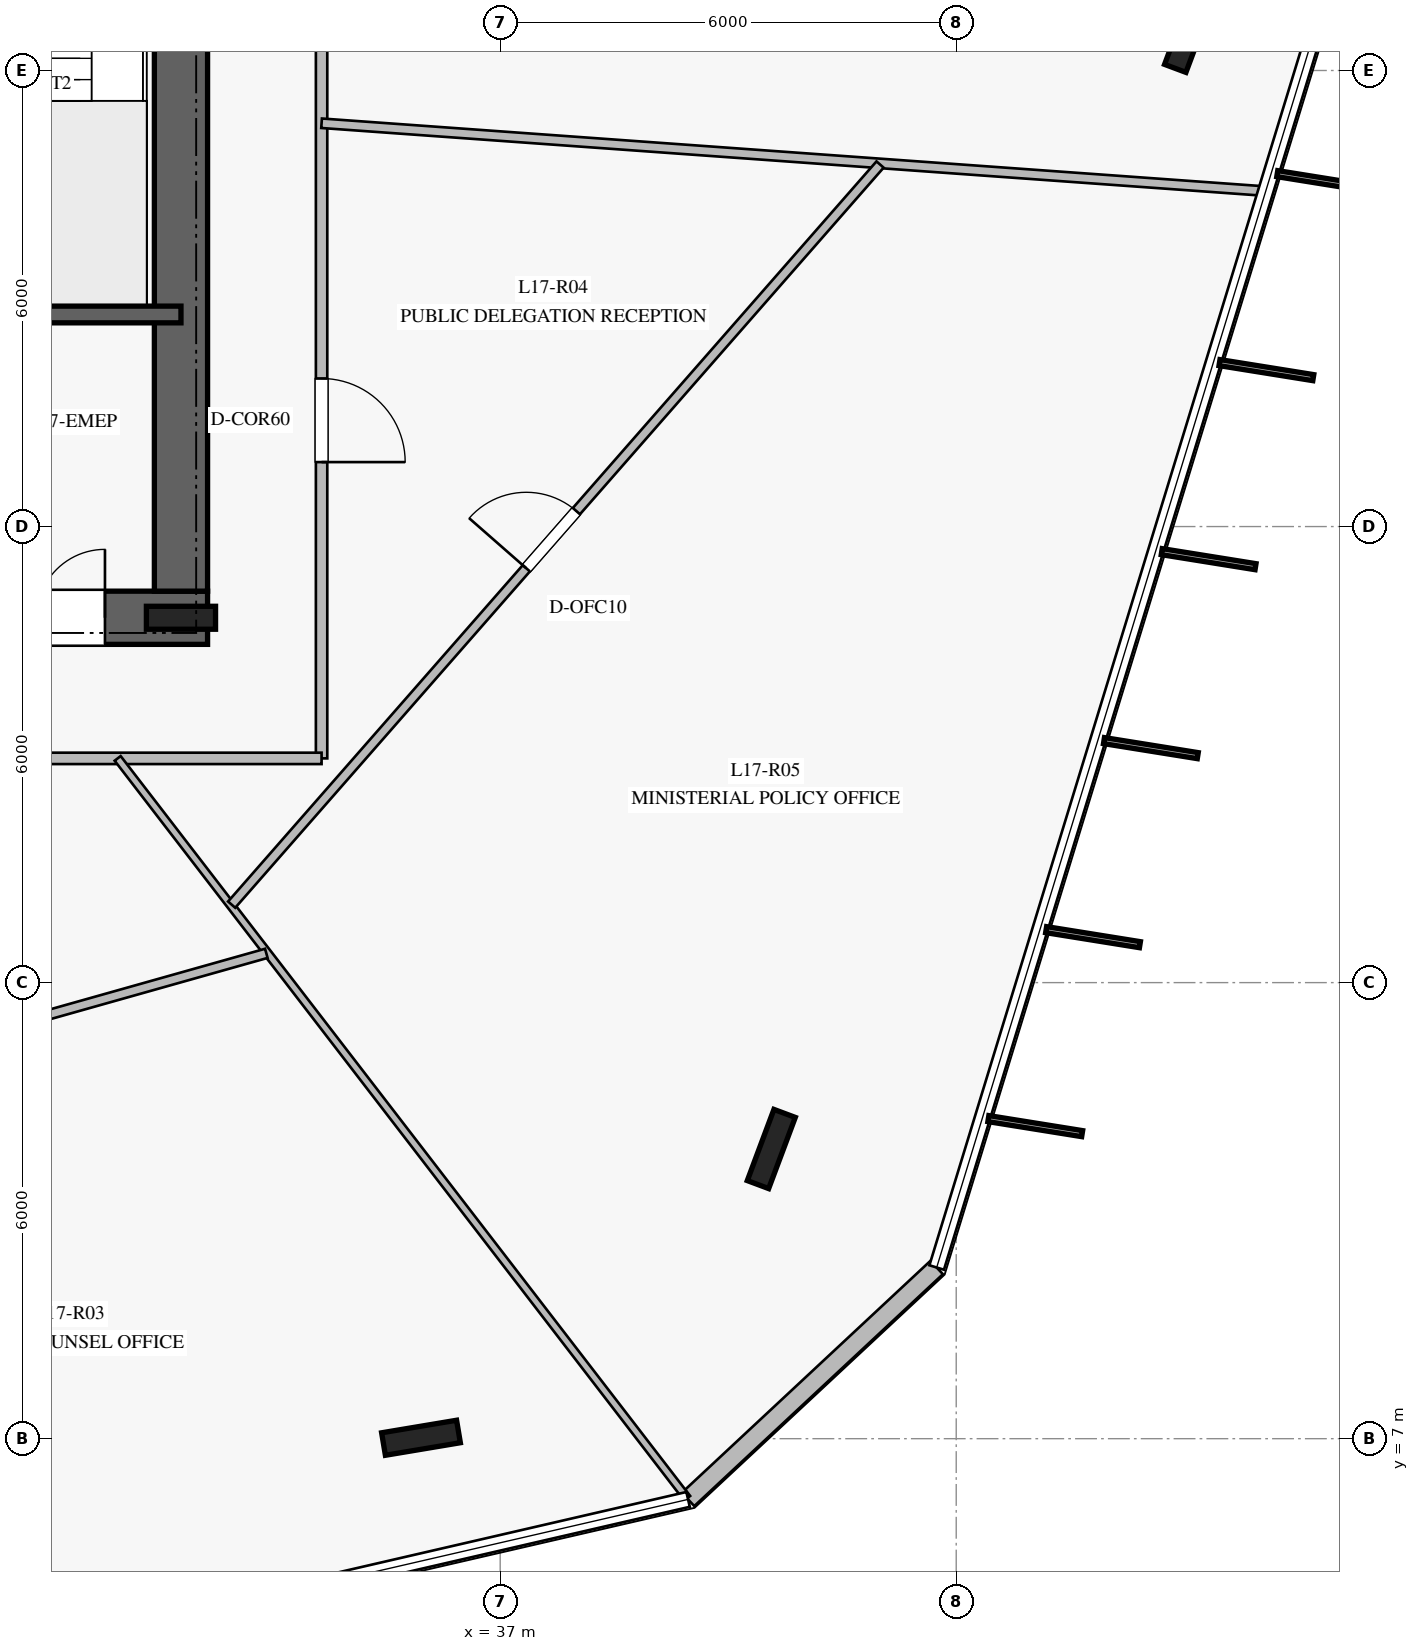
"""IFC4 building model, lengths in metres.
Left out: names, types, materials, properties, quantities, classifications, styles, units other than length and angle.
Written with IfcOpenShell. Run it as: python <this file> out.ifc"""

import sys

from ifc_helpers import new_model, si_unit, direction, frame, frame_2d, origin, origin_2d, place, context, subcontext, project, spatial, rectangle, i_section, extrude, element, fill, save


model = new_model("IFC4")
c1 = context("Model", 3, precision=1e-05, world=origin(), true_north=direction((0.0, 1.0)))
c2 = subcontext(c1, "Body", "Model", "MODEL_VIEW")
j1 = project(units=[si_unit("LENGTHUNIT", "METRE"), si_unit("PLANEANGLEUNIT", "RADIAN")], contexts=[c1])
p1 = place(None, origin())
s1 = spatial("IfcSite", under=j1, at=p1, CompositionType="ELEMENT")
p2 = place(p1, origin())
s2 = spatial("IfcBuilding", under=s1, at=p2, CompositionType="ELEMENT")
p3 = place(p2, frame((0.0, 0.0, 72.0)))
s3 = spatial("IfcBuildingStorey", under=s2, at=p3, CompositionType="ELEMENT", Elevation=72.0)
p4 = place(p3, frame((16.85, 17.8, 0.0), z_axis=(0.0, 0.0, 1.0), x_axis=(1.0, 0.0, 0.0)))
e1 = element("IfcWall", 1, at=p4, inside=s3, PredefinedType="SHEAR", context=c2, shape_type="SweptSolid", body=[
    extrude(rectangle(XDim=16.3, YDim=0.7, at=frame_2d((8.15, 0.0))), origin(), (0.0, 0.0, 1.0), 3.76),
])
p5 = place(p4, frame((5.1, 0.0, 0.0)))
e2 = element("IfcOpeningElement", 2, at=p5, cuts=e1, PredefinedType="OPENING", context=c2, shape_type="SweptSolid", body=[
    extrude(rectangle(XDim=1.2, YDim=2.25, at=frame_2d((0.6, 1.125))), frame((0.0, 0.36, 0.0), z_axis=(0.0, -1.0, 0.0), x_axis=(1.0, 0.0, 0.0)), (0.0, 0.0, 1.0), 0.72),
])
p6 = place(p4, frame((14.05, 0.0, 0.0)))
e3 = element("IfcOpeningElement", 3, at=p6, cuts=e1, PredefinedType="OPENING", context=c2, shape_type="SweptSolid", body=[
    extrude(rectangle(XDim=0.9, YDim=2.1, at=frame_2d((0.45, 1.05))), frame((0.0, 0.36, 0.0), z_axis=(0.0, -1.0, 0.0), x_axis=(1.0, 0.0, 0.0)), (0.0, 0.0, 1.0), 0.72),
])
p7 = place(p4, frame((7.95, 0.0, 0.0)))
e4 = element("IfcOpeningElement", 4, at=p7, cuts=e1, PredefinedType="OPENING", context=c2, shape_type="SweptSolid", body=[
    extrude(rectangle(XDim=1.1, YDim=2.2, at=frame_2d((0.55, 1.1))), frame((0.0, 0.36, 0.0), z_axis=(0.0, -1.0, 0.0), x_axis=(1.0, 0.0, 0.0)), (0.0, 0.0, 1.0), 0.72),
])
p8 = place(p4, frame((9.925, 0.0, 0.0)))
e5 = element("IfcOpeningElement", 5, at=p8, cuts=e1, PredefinedType="OPENING", context=c2, shape_type="SweptSolid", body=[
    extrude(rectangle(XDim=1.1, YDim=2.2, at=frame_2d((0.55, 1.1))), frame((0.0, 0.36, 0.0), z_axis=(0.0, -1.0, 0.0), x_axis=(1.0, 0.0, 0.0)), (0.0, 0.0, 1.0), 0.72),
])
p9 = place(p4, frame((11.9, 0.0, 0.0)))
e6 = element("IfcOpeningElement", 6, at=p9, cuts=e1, PredefinedType="OPENING", context=c2, shape_type="SweptSolid", body=[
    extrude(rectangle(XDim=1.1, YDim=2.2, at=frame_2d((0.55, 1.1))), frame((0.0, 0.36, 0.0), z_axis=(0.0, -1.0, 0.0), x_axis=(1.0, 0.0, 0.0)), (0.0, 0.0, 1.0), 0.72),
])
p10 = place(p3, frame((32.8, 18.15, 0.0), z_axis=(0.0, 0.0, 1.0), x_axis=(0.0, 1.0, 0.0)))
e7 = element("IfcWall", 7, at=p10, inside=s3, PredefinedType="SHEAR", context=c2, shape_type="SweptSolid", body=[
    extrude(rectangle(XDim=13.7, YDim=0.7, at=frame_2d((6.85, 0.0))), origin(), (0.0, 0.0, 1.0), 3.76),
])
p11 = place(p3, frame((32.8, 17.8, 0.0), z_axis=(0.0, 0.0, 1.0), x_axis=(1.0, 0.0, 0.0)))
e8 = element("IfcColumn", 8, at=p11, inside=s3, PredefinedType="COLUMN", context=c2, shape_type="SweptSolid", body=[
    extrude(i_section(OverallWidth=0.302, OverallDepth=0.91, WebThickness=0.021, FlangeThickness=0.04, at=origin_2d()), origin(), (0.0, 0.0, 1.0), 4.0),
])
p12 = place(p3, frame((29.08, 21.79, 0.0), z_axis=(0.0, 0.0, 1.0), x_axis=(1.0, 0.0, 0.0)))
e9 = element("IfcWall", 9, at=p12, inside=s3, PredefinedType="SOLIDWALL", context=c2, shape_type="SweptSolid", body=[
    extrude(rectangle(XDim=3.72, YDim=0.22, at=frame_2d((1.86, 0.0))), origin(), (0.0, 0.0, 1.0), 3.76),
])
for number, where, z_axis, x_axis in (
    (10, (35.958, 7.012, 0.0), (0.0, 0.0, 1.0), (0.986, 0.165, 0.0)),
    (11, (40.567, 10.811, 0.0), (0.0, 0.0, 1.0), (0.35, 0.937, 0.0)),
    (12, (46.057, 25.496, 0.0), (0.0, 0.0, 1.0), (0.35, 0.937, 0.0)),
):
    element("IfcColumn", number, at=place(p3, frame(where, z_axis=z_axis, x_axis=x_axis)), inside=s3, PredefinedType="COLUMN", context=c2, shape_type="SweptSolid", body=[
        extrude(i_section(OverallWidth=0.3, OverallDepth=1.0, WebThickness=0.019, FlangeThickness=0.036, at=origin_2d()), origin(), (0.0, 0.0, 1.0), 4.0),
    ])
p13 = place(p3, frame((39.472, 6.201, 0.0), z_axis=(0.0, 0.0, 1.0), x_axis=(0.731267590606, 0.682090691133, 0.0)))
e13 = element("IfcWall", 13, at=p13, inside=s3, PredefinedType="STANDARD", context=c2, shape_type="SweptSolid", body=[
    extrude(rectangle(XDim=4.473, YDim=0.24, at=frame_2d((2.237, 0.0))), origin(), (0.0, 0.0, 1.0), 3.76),
])
p14 = place(p3, frame((34.65, 34.05, 0.0), z_axis=(0.0, 0.0, 1.0), x_axis=(0.0, -1.0, 0.0)))
e14 = element("IfcWall", 14, at=p14, inside=s3, PredefinedType="PARTITIONING", context=c2, shape_type="SweptSolid", body=[
    extrude(rectangle(XDim=18.1, YDim=0.15, at=frame_2d((9.05, 0.0))), origin(), (0.0, 0.0, 1.0), 3.21),
])
p15 = place(p14, frame((13.102, 0.0, 0.0)))
e15 = element("IfcOpeningElement", 15, at=p15, cuts=e14, PredefinedType="OPENING", context=c2, shape_type="SweptSolid", body=[
    extrude(rectangle(XDim=1.1, YDim=2.2, at=frame_2d((0.55, 1.1))), frame((0.0, 0.085, 0.0), z_axis=(0.0, -1.0, 0.0), x_axis=(1.0, 0.0, 0.0)), (0.0, 0.0, 1.0), 0.17),
])
p16 = place(p3, frame((34.65, 15.95, 0.0), z_axis=(0.0, 0.0, 1.0), x_axis=(-1.0, 0.0, 0.0)))
e16 = element("IfcWall", 16, at=p16, inside=s3, PredefinedType="PARTITIONING", context=c2, shape_type="SweptSolid", body=[
    extrude(rectangle(XDim=19.3, YDim=0.15, at=frame_2d((9.65, 0.0))), origin(), (0.0, 0.0, 1.0), 3.21),
])
p17 = place(p16, frame((14.677, 0.0, 0.0)))
e17 = element("IfcOpeningElement", 17, at=p17, cuts=e16, PredefinedType="OPENING", context=c2, shape_type="SweptSolid", body=[
    extrude(rectangle(XDim=1.1, YDim=2.2, at=frame_2d((0.55, 1.1))), frame((0.0, 0.085, 0.0), z_axis=(0.0, -1.0, 0.0), x_axis=(1.0, 0.0, 0.0)), (0.0, 0.0, 1.0), 0.17),
])
p18 = place(p16, frame((6.518, 0.0, 0.0)))
e18 = element("IfcOpeningElement", 18, at=p18, cuts=e16, PredefinedType="OPENING", context=c2, shape_type="SweptSolid", body=[
    extrude(rectangle(XDim=1.1, YDim=2.2, at=frame_2d((0.55, 1.1))), frame((0.0, 0.085, 0.0), z_axis=(0.0, -1.0, 0.0), x_axis=(1.0, 0.0, 0.0)), (0.0, 0.0, 1.0), 0.17),
])
p19 = place(p3, frame((31.967, 15.95, 0.0), z_axis=(0.0, 0.0, 1.0), x_axis=(0.609982546542, -0.792414848999, 0.0)))
e19 = element("IfcWall", 19, at=p19, inside=s3, PredefinedType="MOVABLE", context=c2, shape_type="SweptSolid", body=[
    extrude(rectangle(XDim=12.284, YDim=0.1, at=frame_2d((6.142, 0.0))), origin(), (0.0, 0.0, 1.0), 3.06),
])
p20 = place(p3, frame((34.65, 24.306, 0.0), z_axis=(0.0, 0.0, 1.0), x_axis=(0.997425610376, -0.071708798384, 0.0)))
e20 = element("IfcWall", 20, at=p20, inside=s3, PredefinedType="PARTITIONING", context=c2, shape_type="SweptSolid", body=[
    extrude(rectangle(XDim=12.437, YDim=0.125, at=frame_2d((6.219, 0.0))), origin(), (0.0, 0.0, 1.0), 3.05),
])
p21 = place(p3, frame((21.941, 10.008, 0.0), z_axis=(0.0, 0.0, 1.0), x_axis=(0.962504966676, 0.271264057928, 0.0)))
e21 = element("IfcWall", 21, at=p21, inside=s3, PredefinedType="PARTITIONING", context=c2, shape_type="SweptSolid", body=[
    extrude(rectangle(XDim=12.449, YDim=0.125, at=frame_2d((6.225, 0.0))), origin(), (0.0, 0.0, 1.0), 3.21),
])
p22 = place(p21, frame((5.724, 0.0, 0.0)))
e22 = element("IfcOpeningElement", 22, at=p22, cuts=e21, PredefinedType="OPENING", context=c2, shape_type="SweptSolid", body=[
    extrude(rectangle(XDim=1.0, YDim=2.15, at=frame_2d((0.5, 1.075))), frame((0.0, 0.073, 0.0), z_axis=(0.0, -1.0, 0.0), x_axis=(1.0, 0.0, 0.0)), (0.0, 0.0, 1.0), 0.145),
])
p23 = place(p3, frame((33.467, 14.026, 0.0), z_axis=(0.0, 0.0, 1.0), x_axis=(0.65898913026, 0.752152462071, 0.0)))
e23 = element("IfcWall", 23, at=p23, inside=s3, PredefinedType="PARTITIONING", context=c2, shape_type="SweptSolid", body=[
    extrude(rectangle(XDim=12.946, YDim=0.125, at=frame_2d((6.473, 0.0))), origin(), (0.0, 0.0, 1.0), 3.05),
])
p24 = place(p23, frame((5.883, 0.0, 0.0)))
e24 = element("IfcOpeningElement", 24, at=p24, cuts=e23, PredefinedType="OPENING", context=c2, shape_type="SweptSolid", body=[
    extrude(rectangle(XDim=1.0, YDim=2.15, at=frame_2d((0.5, 1.075))), frame((0.0, 0.073, 0.0), z_axis=(0.0, -1.0, 0.0), x_axis=(1.0, 0.0, 0.0)), (0.0, 0.0, 1.0), 0.145),
])
p25 = place(p6, origin())
e25 = element("IfcDoor", 25, at=p25, inside=s3, OperationType="SINGLE_SWING_RIGHT", PredefinedType="DOOR", context=c2, shape_type="SweptSolid", body=[
    extrude(rectangle(XDim=0.9, YDim=2.1, at=frame_2d((0.45, 1.05))), frame((0.0, 0.025, 0.0), z_axis=(0.0, -1.0, 0.0), x_axis=(1.0, 0.0, 0.0)), (0.0, 0.0, 1.0), 0.05),
])
fill(e3, e25)
p26 = place(p15, origin())
e26 = element("IfcDoor", 26, at=p26, inside=s3, OperationType="SINGLE_SWING_RIGHT", PredefinedType="DOOR", context=c2, shape_type="SweptSolid", body=[
    extrude(rectangle(XDim=1.1, YDim=2.2, at=frame_2d((0.55, 1.1))), frame((0.0, 0.025, 0.0), z_axis=(0.0, -1.0, 0.0), x_axis=(1.0, 0.0, 0.0)), (0.0, 0.0, 1.0), 0.05),
])
fill(e15, e26)
p27 = place(p24, origin())
e27 = element("IfcDoor", 27, at=p27, inside=s3, OperationType="SINGLE_SWING_LEFT", PredefinedType="DOOR", context=c2, shape_type="SweptSolid", body=[
    extrude(rectangle(XDim=1.0, YDim=2.15, at=frame_2d((0.5, 1.075))), frame((0.0, 0.025, 0.0), z_axis=(0.0, -1.0, 0.0), x_axis=(1.0, 0.0, 0.0)), (0.0, 0.0, 1.0), 0.05),
])
fill(e24, e27)
save(model, sys.argv[1])
